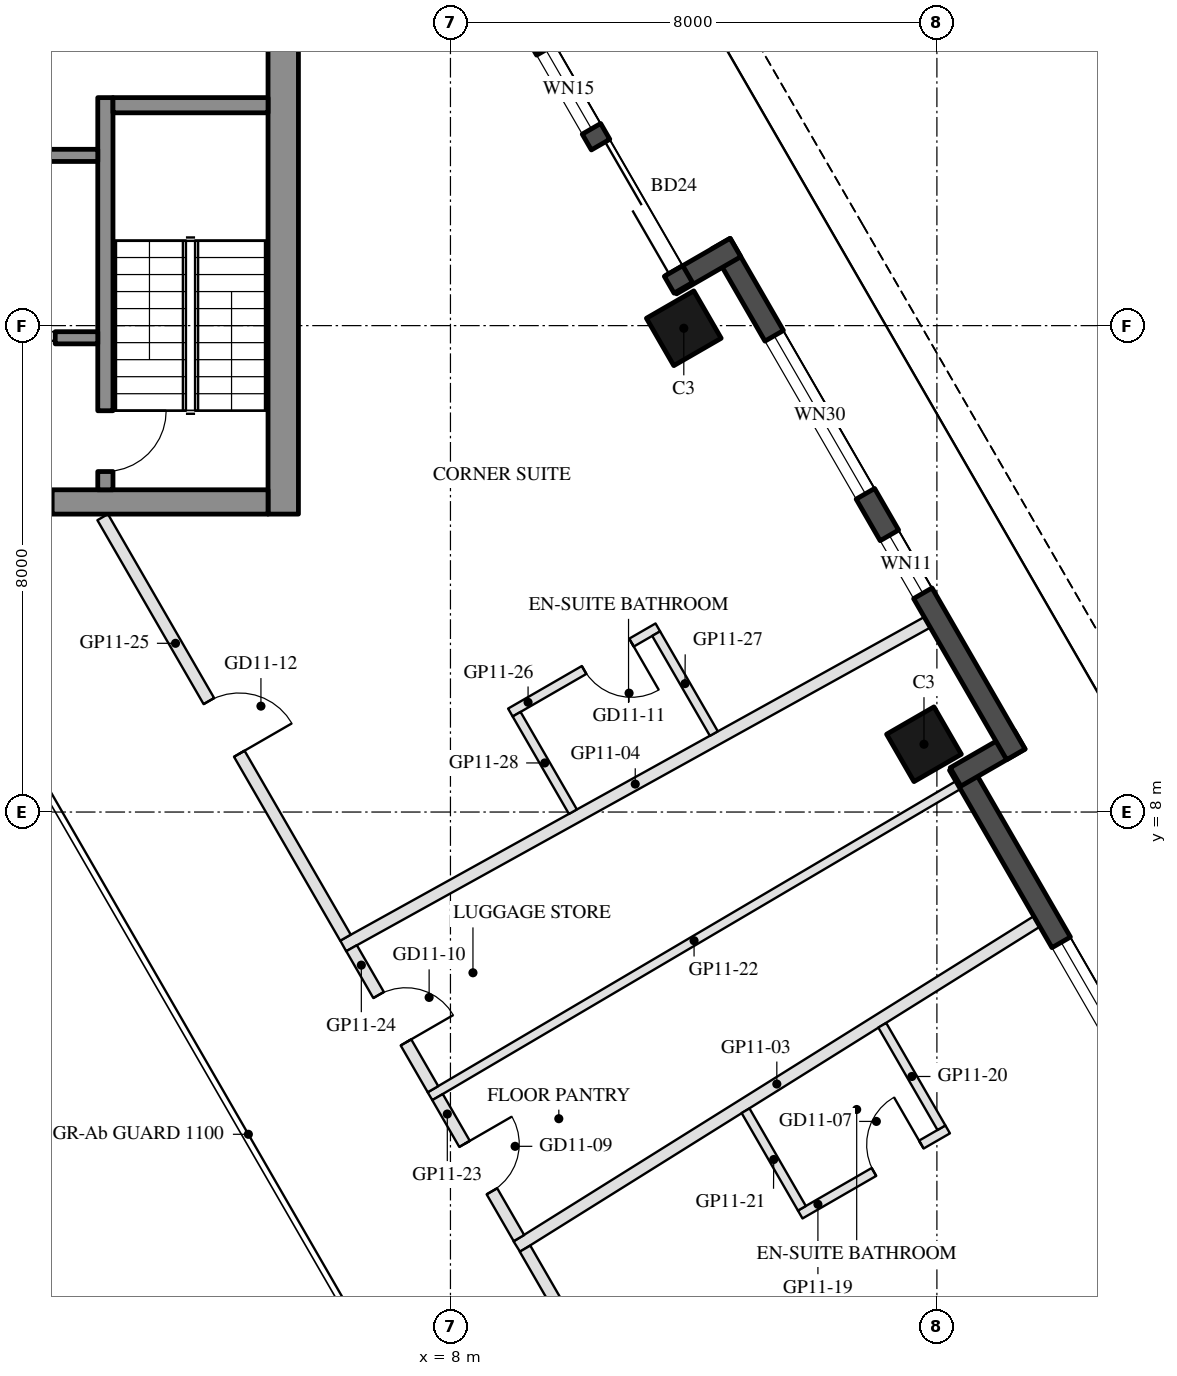
"""IFC4 building model, lengths in metres.
Left out: names, types, materials, properties, quantities, classifications, styles, units other than length and angle.
Written with IfcOpenShell. Run it as: python <this file> out.ifc"""

import sys

from ifc_helpers import new_model, si_unit, direction, frame, frame_2d, origin, origin_2d, place, context, subcontext, project, spatial, rectangle, hollow_rectangle, extrude, element, fill, save


model = new_model("IFC4")
c1 = context("Model", 3, precision=1e-05, world=origin(), true_north=direction((0.0, 1.0)))
c2 = subcontext(c1, "Body", "Model", "MODEL_VIEW")
j1 = project(units=[si_unit("LENGTHUNIT", "METRE"), si_unit("PLANEANGLEUNIT", "RADIAN")], contexts=[c1])
p1 = place(None, origin())
s1 = spatial("IfcSite", under=j1, at=p1, CompositionType="ELEMENT")
p2 = place(p1, origin())
s2 = spatial("IfcBuilding", under=s1, at=p2, CompositionType="ELEMENT")
p3 = place(p2, frame((0.0, 0.0, 124.2)))
s3 = spatial("IfcBuildingStorey", under=s2, at=p3, CompositionType="ELEMENT", Elevation=124.2)
for number, where, z_axis, x_axis in (
    (1, (15.788, 9.115, 0.0), (0.0, 0.0, 1.0), (-0.5, 0.866, 0.0)),
    (2, (11.838, 15.957, 0.0), (0.0, 0.0, 1.0), (-0.5, 0.866, 0.0)),
):
    element("IfcColumn", number, at=place(p3, frame(where, z_axis=z_axis, x_axis=x_axis)), inside=s3, PredefinedType="COLUMN", context=c2, shape_type="SweptSolid", body=[
        extrude(hollow_rectangle(XDim=0.9, YDim=0.9, WallThickness=0.04, at=origin_2d()), origin(), (0.0, 0.0, 1.0), 3.7),
    ])
p4 = place(p3, frame((19.729, 2.938, 0.0), z_axis=(0.0, 0.0, 1.0), x_axis=(-0.499976430342, 0.866039011305, 0.0)))
e3 = element("IfcWall", 3, at=p4, inside=s3, PredefinedType="SOLIDWALL", context=c2, shape_type="SweptSolid", body=[
    extrude(rectangle(XDim=6.74, YDim=0.35, at=frame_2d((3.37, 0.0))), origin(), (0.0, 0.0, 1.0), 3.55),
])
p5 = place(p4, frame((0.77, 0.0, 0.3)))
e4 = element("IfcOpeningElement", 4, at=p5, cuts=e3, PredefinedType="OPENING", context=c2, shape_type="SweptSolid", body=[
    extrude(rectangle(XDim=2.6, YDim=2.65, at=frame_2d((1.3, 1.325))), frame((0.0, 0.185, 0.0), z_axis=(0.0, -1.0, 0.0), x_axis=(1.0, 0.0, 0.0)), (0.0, 0.0, 1.0), 0.37),
])
p6 = place(p3, frame((16.306, 8.577, 0.0), z_axis=(0.0, 0.0, 1.0), x_axis=(0.866092288191, 0.499884134912, 0.0)))
e5 = element("IfcWall", 5, at=p6, inside=s3, PredefinedType="SOLIDWALL", context=c2, shape_type="SweptSolid", body=[
    extrude(rectangle(XDim=1.22, YDim=0.35, at=frame_2d((0.61, 0.0))), origin(), (0.0, 0.0, 1.0), 3.55),
])
p7 = place(p3, frame((17.299, 8.948, 0.0), z_axis=(0.0, 0.0, 1.0), x_axis=(-0.500010041276, 0.866019606374, 0.0)))
e6 = element("IfcWall", 6, at=p7, inside=s3, PredefinedType="SOLIDWALL", context=c2, shape_type="SweptSolid", body=[
    extrude(rectangle(XDim=9.7, YDim=0.35, at=frame_2d((4.85, 0.0))), origin(), (0.0, 0.0, 1.0), 3.55),
])
p8 = place(p7, frame((3.06, 0.0, 0.3)))
e7 = element("IfcOpeningElement", 7, at=p8, cuts=e6, PredefinedType="OPENING", context=c2, shape_type="SweptSolid", body=[
    extrude(rectangle(XDim=1.1, YDim=2.65, at=frame_2d((0.55, 1.325))), frame((0.0, 0.185, 0.0), z_axis=(0.0, -1.0, 0.0), x_axis=(1.0, 0.0, 0.0)), (0.0, 0.0, 1.0), 0.37),
])
p9 = place(p7, frame((4.949, 0.0, 0.3)))
e8 = element("IfcOpeningElement", 8, at=p9, cuts=e6, PredefinedType="OPENING", context=c2, shape_type="SweptSolid", body=[
    extrude(rectangle(XDim=3.0, YDim=2.65, at=frame_2d((1.5, 1.325))), frame((0.0, 0.185, 0.0), z_axis=(0.0, -1.0, 0.0), x_axis=(1.0, 0.0, 0.0)), (0.0, 0.0, 1.0), 0.37),
])
p10 = place(p3, frame((12.688, 17.284, 0.0), z_axis=(0.0, 0.0, 1.0), x_axis=(-0.865955602162, -0.500120880472, 0.0)))
e9 = element("IfcWall", 9, at=p10, inside=s3, PredefinedType="SOLIDWALL", context=c2, shape_type="SweptSolid", body=[
    extrude(rectangle(XDim=1.22, YDim=0.35, at=frame_2d((0.61, 0.0))), origin(), (0.0, 0.0, 1.0), 3.55),
])
p11 = place(p3, frame((11.829, 16.621, 0.0), z_axis=(0.0, 0.0, 1.0), x_axis=(-0.500003597184, 0.866023326939, 0.0)))
e10 = element("IfcWall", 10, at=p11, inside=s3, PredefinedType="SOLIDWALL", context=c2, shape_type="SweptSolid", body=[
    extrude(rectangle(XDim=6.74, YDim=0.35, at=frame_2d((3.37, 0.0))), origin(), (0.0, 0.0, 1.0), 3.55),
])
p12 = place(p11, frame((0.32, 0.0, 0.0)))
e11 = element("IfcOpeningElement", 11, at=p12, cuts=e10, PredefinedType="OPENING", context=c2, shape_type="SweptSolid", body=[
    extrude(rectangle(XDim=2.4, YDim=2.4, at=frame_2d((1.2, 1.2))), frame((0.0, 0.185, 0.0), z_axis=(0.0, -1.0, 0.0), x_axis=(1.0, 0.0, 0.0)), (0.0, 0.0, 1.0), 0.37),
])
p13 = place(p11, frame((3.02, 0.0, 0.3)))
e12 = element("IfcOpeningElement", 12, at=p13, cuts=e10, PredefinedType="OPENING", context=c2, shape_type="SweptSolid", body=[
    extrude(rectangle(XDim=1.5, YDim=2.65, at=frame_2d((0.75, 1.325))), frame((0.0, 0.185, 0.0), z_axis=(0.0, -1.0, 0.0), x_axis=(1.0, 0.0, 0.0)), (0.0, 0.0, 1.0), 0.37),
])
p14 = place(p11, frame((4.82, 0.0, 0.3)))
e13 = element("IfcOpeningElement", 13, at=p14, cuts=e10, PredefinedType="OPENING", context=c2, shape_type="SweptSolid", body=[
    extrude(rectangle(XDim=1.5, YDim=2.65, at=frame_2d((0.75, 1.325))), frame((0.0, 0.185, 0.0), z_axis=(0.0, -1.0, 0.0), x_axis=(1.0, 0.0, 0.0)), (0.0, 0.0, 1.0), 0.37),
])
p15 = place(p3, frame((5.25, 12.9, 0.0), z_axis=(0.0, 0.0, 1.0), x_axis=(0.0, 1.0, 0.0)))
e14 = element("IfcWall", 14, at=p15, inside=s3, PredefinedType="SHEAR", context=c2, shape_type="SweptSolid", body=[
    extrude(rectangle(XDim=14.837, YDim=0.5, at=frame_2d((7.418, 0.0))), origin(), (0.0, 0.0, 1.0), 3.5),
])
p16 = place(p3, frame((5.0, 13.1, 0.0), z_axis=(0.0, 0.0, 1.0), x_axis=(-1.0, 0.0, 0.0)))
e15 = element("IfcWall", 15, at=p16, inside=s3, PredefinedType="SHEAR", context=c2, shape_type="SweptSolid", body=[
    extrude(rectangle(XDim=10.0, YDim=0.4, at=frame_2d((5.0, 0.0))), origin(), (0.0, 0.0, 1.0), 3.5),
])
p17 = place(p16, frame((3.55, 0.0, 0.0)))
e16 = element("IfcOpeningElement", 16, at=p17, cuts=e15, PredefinedType="OPENING", context=c2, shape_type="SweptSolid", body=[
    extrude(rectangle(XDim=1.1, YDim=2.1, at=frame_2d((0.55, 1.05))), frame((0.0, 0.21, 0.0), z_axis=(0.0, -1.0, 0.0), x_axis=(1.0, 0.0, 0.0)), (0.0, 0.0, 1.0), 0.42),
])
p18 = place(p16, frame((5.85, 0.0, 0.0)))
e17 = element("IfcOpeningElement", 17, at=p18, cuts=e15, PredefinedType="OPENING", context=c2, shape_type="SweptSolid", body=[
    extrude(rectangle(XDim=1.4, YDim=2.1, at=frame_2d((0.7, 1.05))), frame((0.0, 0.21, 0.0), z_axis=(0.0, -1.0, 0.0), x_axis=(1.0, 0.0, 0.0)), (0.0, 0.0, 1.0), 0.42),
])
p19 = place(p3, frame((2.325, 13.3, 0.0), z_axis=(0.0, 0.0, 1.0), x_axis=(0.0, 1.0, 0.0)))
e18 = element("IfcWall", 18, at=p19, inside=s3, PredefinedType="SHEAR", context=c2, shape_type="SweptSolid", body=[
    extrude(rectangle(XDim=6.45, YDim=0.25, at=frame_2d((3.225, 0.0))), origin(), (0.0, 0.0, 1.0), 3.5),
])
p20 = place(p19, frame((0.3, 0.0, 0.0)))
e19 = element("IfcOpeningElement", 19, at=p20, cuts=e18, PredefinedType="OPENING", context=c2, shape_type="SweptSolid", body=[
    extrude(rectangle(XDim=1.0, YDim=2.1, at=frame_2d((0.5, 1.05))), frame((0.0, 0.135, 0.0), z_axis=(0.0, -1.0, 0.0), x_axis=(1.0, 0.0, 0.0)), (0.0, 0.0, 1.0), 0.27),
])
p21 = place(p3, frame((5.0, 19.625, 0.0), z_axis=(0.0, 0.0, 1.0), x_axis=(-1.0, 0.0, 0.0)))
e20 = element("IfcWall", 20, at=p21, inside=s3, PredefinedType="SHEAR", context=c2, shape_type="SweptSolid", body=[
    extrude(rectangle(XDim=2.55, YDim=0.25, at=frame_2d((1.275, 0.0))), origin(), (0.0, 0.0, 1.0), 3.5),
])
p22 = place(p3, frame((2.2, 18.8, 0.0), z_axis=(0.0, 0.0, 1.0), x_axis=(-1.0, 0.0, 0.0)))
e21 = element("IfcWall", 21, at=p22, inside=s3, PredefinedType="SHEAR", context=c2, shape_type="SweptSolid", body=[
    extrude(rectangle(XDim=2.8, YDim=0.2, at=frame_2d((1.4, 0.0))), origin(), (0.0, 0.0, 1.0), 3.5),
])
p23 = place(p3, frame((2.2, 15.8, 0.0), z_axis=(0.0, 0.0, 1.0), x_axis=(-1.0, 0.0, 0.0)))
e22 = element("IfcWall", 22, at=p23, inside=s3, PredefinedType="SHEAR", context=c2, shape_type="SweptSolid", body=[
    extrude(rectangle(XDim=2.8, YDim=0.2, at=frame_2d((1.4, 0.0))), origin(), (0.0, 0.0, 1.0), 3.5),
])
p24 = place(p23, frame((0.7, 0.0, 0.0)))
e23 = element("IfcOpeningElement", 23, at=p24, cuts=e22, PredefinedType="OPENING", context=c2, shape_type="SweptSolid", body=[
    extrude(rectangle(XDim=1.2, YDim=2.1, at=frame_2d((0.6, 1.05))), frame((0.0, 0.11, 0.0), z_axis=(0.0, -1.0, 0.0), x_axis=(1.0, 0.0, 0.0)), (0.0, 0.0, 1.0), 0.22),
])
p25 = place(p3, frame((17.643, 6.201, 0.0), z_axis=(0.0, 0.0, 1.0), x_axis=(-0.84787317287, -0.530199097252, 0.0)))
e24 = element("IfcWall", 24, at=p25, inside=s3, PredefinedType="PARTITIONING", context=c2, shape_type="SweptSolid", body=[
    extrude(rectangle(XDim=10.086, YDim=0.2, at=frame_2d((5.043, 0.0))), origin(), (0.0, 0.0, 1.0), 2.95),
])
p26 = place(p3, frame((15.842, 11.121, 0.0), z_axis=(0.0, 0.0, 1.0), x_axis=(-0.87471248602, -0.484642204931, 0.0)))
e25 = element("IfcWall", 25, at=p26, inside=s3, PredefinedType="PARTITIONING", context=c2, shape_type="SweptSolid", body=[
    extrude(rectangle(XDim=10.982, YDim=0.2, at=frame_2d((5.491, 0.0))), origin(), (0.0, 0.0, 1.0), 2.96),
])
p27 = place(p3, frame((9.226, 0.819, 0.0), z_axis=(0.0, 0.0, 1.0), x_axis=(0.500031571837, -0.866007175009, 0.0)))
e26 = element("IfcWall", 26, at=p27, inside=s3, PredefinedType="PARTITIONING", context=c2, shape_type="SweptSolid", body=[
    extrude(rectangle(XDim=6.084, YDim=0.2, at=frame_2d((3.042, 0.0))), origin(), (0.0, 0.0, 1.0), 2.95),
])
p28 = place(p27, frame((2.542, 0.0, 0.0)))
e27 = element("IfcOpeningElement", 27, at=p28, cuts=e26, PredefinedType="OPENING", context=c2, shape_type="SweptSolid", body=[
    extrude(rectangle(XDim=1.0, YDim=2.1, at=frame_2d((0.5, 1.05))), frame((0.0, 0.11, 0.0), z_axis=(0.0, -1.0, 0.0), x_axis=(1.0, 0.0, 0.0)), (0.0, 0.0, 1.0), 0.22),
])
p29 = place(p3, frame((13.752, 1.381, 0.0), z_axis=(0.0, 0.0, 1.0), x_axis=(0.866034573852, 0.49998411664, 0.0)))
e28 = element("IfcWall", 28, at=p29, inside=s3, PredefinedType="PARTITIONING", context=c2, shape_type="SweptSolid", body=[
    extrude(rectangle(XDim=2.8, YDim=0.15, at=frame_2d((1.4, 0.0))), origin(), (0.0, 0.0, 1.0), 3.55),
])
p30 = place(p29, frame((1.4, 0.0, 0.0)))
e29 = element("IfcOpeningElement", 29, at=p30, cuts=e28, PredefinedType="OPENING", context=c2, shape_type="SweptSolid", body=[
    extrude(rectangle(XDim=0.9, YDim=2.1, at=frame_2d((0.45, 1.05))), frame((0.0, 0.085, 0.0), z_axis=(0.0, -1.0, 0.0), x_axis=(1.0, 0.0, 0.0)), (0.0, 0.0, 1.0), 0.17),
])
p31 = place(p3, frame((16.075, 2.808, 0.0), z_axis=(0.0, 0.0, 1.0), x_axis=(-0.500051850797, 0.865995465643, 0.0)))
e30 = element("IfcWall", 30, at=p31, inside=s3, PredefinedType="PARTITIONING", context=c2, shape_type="SweptSolid", body=[
    extrude(rectangle(XDim=1.946, YDim=0.15, at=frame_2d((0.973, 0.0))), origin(), (0.0, 0.0, 1.0), 2.95),
])
p32 = place(p3, frame((13.78, 1.483, 0.0), z_axis=(0.0, 0.0, 1.0), x_axis=(-0.499965806267, 0.866045144646, 0.0)))
e31 = element("IfcWall", 31, at=p32, inside=s3, PredefinedType="PARTITIONING", context=c2, shape_type="SweptSolid", body=[
    extrude(rectangle(XDim=1.853, YDim=0.15, at=frame_2d((0.926, 0.0))), origin(), (0.0, 0.0, 1.0), 2.95),
])
p33 = place(p3, frame((16.349, 8.443, 0.0), z_axis=(0.0, 0.0, 1.0), x_axis=(-0.861589721102, -0.507605311724, 0.0)))
e32 = element("IfcWall", 32, at=p33, inside=s3, PredefinedType="PARTITIONING", context=c2, shape_type="SweptSolid", body=[
    extrude(rectangle(XDim=10.081, YDim=0.15, at=frame_2d((5.04, 0.0))), origin(), (0.0, 0.0, 1.0), 2.96),
])
p34 = place(p3, frame((7.788, 3.312, 0.0), z_axis=(0.0, 0.0, 1.0), x_axis=(0.499953984692, -0.866051969105, 0.0)))
e33 = element("IfcWall", 33, at=p34, inside=s3, PredefinedType="PARTITIONING", context=c2, shape_type="SweptSolid", body=[
    extrude(rectangle(XDim=2.677, YDim=0.2, at=frame_2d((1.339, 0.0))), origin(), (0.0, 0.0, 1.0), 3.55),
])
p35 = place(p34, frame((0.889, 0.0, 0.0)))
e34 = element("IfcOpeningElement", 34, at=p35, cuts=e33, PredefinedType="OPENING", context=c2, shape_type="SweptSolid", body=[
    extrude(rectangle(XDim=0.9, YDim=2.1, at=frame_2d((0.45, 1.05))), frame((0.0, 0.11, 0.0), z_axis=(0.0, -1.0, 0.0), x_axis=(1.0, 0.0, 0.0)), (0.0, 0.0, 1.0), 0.22),
])
p36 = place(p3, frame((6.374, 5.76, 0.0), z_axis=(0.0, 0.0, 1.0), x_axis=(0.499982891145, -0.866035281361, 0.0)))
e35 = element("IfcWall", 35, at=p36, inside=s3, PredefinedType="PARTITIONING", context=c2, shape_type="SweptSolid", body=[
    extrude(rectangle(XDim=2.678, YDim=0.2, at=frame_2d((1.339, 0.0))), origin(), (0.0, 0.0, 1.0), 2.95),
])
p37 = place(p36, frame((0.889, 0.0, 0.0)))
e36 = element("IfcOpeningElement", 36, at=p37, cuts=e35, PredefinedType="OPENING", context=c2, shape_type="SweptSolid", body=[
    extrude(rectangle(XDim=0.9, YDim=2.1, at=frame_2d((0.45, 1.05))), frame((0.0, 0.11, 0.0), z_axis=(0.0, -1.0, 0.0), x_axis=(1.0, 0.0, 0.0)), (0.0, 0.0, 1.0), 0.22),
])
p38 = place(p3, frame((2.281, 12.85, 0.0), z_axis=(0.0, 0.0, 1.0), x_axis=(0.499992362392, -0.866029813314, 0.0)))
e37 = element("IfcWall", 37, at=p38, inside=s3, PredefinedType="PARTITIONING", context=c2, shape_type="SweptSolid", body=[
    extrude(rectangle(XDim=7.986, YDim=0.2, at=frame_2d((3.993, 0.0))), origin(), (0.0, 0.0, 1.0), 2.95),
])
p39 = place(p38, frame((3.493, 0.0, 0.0)))
e38 = element("IfcOpeningElement", 38, at=p39, cuts=e37, PredefinedType="OPENING", context=c2, shape_type="SweptSolid", body=[
    extrude(rectangle(XDim=1.0, YDim=2.1, at=frame_2d((0.5, 1.05))), frame((0.0, 0.11, 0.0), z_axis=(0.0, -1.0, 0.0), x_axis=(1.0, 0.0, 0.0)), (0.0, 0.0, 1.0), 0.22),
])
p40 = place(p3, frame((11.41, 11.037, 0.0), z_axis=(0.0, 0.0, 1.0), x_axis=(-0.866034573852, -0.49998411664, 0.0)))
e39 = element("IfcWall", 39, at=p40, inside=s3, PredefinedType="PARTITIONING", context=c2, shape_type="SweptSolid", body=[
    extrude(rectangle(XDim=2.8, YDim=0.15, at=frame_2d((1.4, 0.0))), origin(), (0.0, 0.0, 1.0), 2.95),
])
p41 = place(p40, frame((0.5, 0.0, 0.0)))
e40 = element("IfcOpeningElement", 40, at=p41, cuts=e39, PredefinedType="OPENING", context=c2, shape_type="SweptSolid", body=[
    extrude(rectangle(XDim=0.9, YDim=2.1, at=frame_2d((0.45, 1.05))), frame((0.0, 0.085, 0.0), z_axis=(0.0, -1.0, 0.0), x_axis=(1.0, 0.0, 0.0)), (0.0, 0.0, 1.0), 0.17),
])
p42 = place(p3, frame((12.332, 9.29, 0.0), z_axis=(0.0, 0.0, 1.0), x_axis=(-0.499971120268, 0.866042076863, 0.0)))
e41 = element("IfcWall", 41, at=p42, inside=s3, PredefinedType="PARTITIONING", context=c2, shape_type="SweptSolid", body=[
    extrude(rectangle(XDim=1.898, YDim=0.15, at=frame_2d((0.949, 0.0))), origin(), (0.0, 0.0, 1.0), 3.55),
])
p43 = place(p3, frame((10.014, 8.006, 0.0), z_axis=(0.0, 0.0, 1.0), x_axis=(-0.500053484023, 0.865994522568, 0.0)))
e42 = element("IfcWall", 42, at=p43, inside=s3, PredefinedType="PARTITIONING", context=c2, shape_type="SweptSolid", body=[
    extrude(rectangle(XDim=1.851, YDim=0.15, at=frame_2d((0.926, 0.0))), origin(), (0.0, 0.0, 1.0), 3.55),
])
p44 = place(p5, origin())
e43 = element("IfcWindow", 43, at=p44, inside=s3, PartitioningType="SINGLE_PANEL", PredefinedType="WINDOW", context=c2, shape_type="SweptSolid", body=[
    extrude(rectangle(XDim=2.6, YDim=2.65, at=frame_2d((1.3, 1.325))), frame((0.0, 0.03, 0.0), z_axis=(0.0, -1.0, 0.0), x_axis=(1.0, 0.0, 0.0)), (0.0, 0.0, 1.0), 0.06),
])
fill(e4, e43)
p45 = place(p8, origin())
e44 = element("IfcWindow", 44, at=p45, inside=s3, PartitioningType="SINGLE_PANEL", PredefinedType="WINDOW", context=c2, shape_type="SweptSolid", body=[
    extrude(rectangle(XDim=1.1, YDim=2.65, at=frame_2d((0.55, 1.325))), frame((0.0, 0.03, 0.0), z_axis=(0.0, -1.0, 0.0), x_axis=(1.0, 0.0, 0.0)), (0.0, 0.0, 1.0), 0.06),
])
fill(e7, e44)
p46 = place(p9, origin())
e45 = element("IfcWindow", 45, at=p46, inside=s3, PartitioningType="SINGLE_PANEL", PredefinedType="WINDOW", context=c2, shape_type="SweptSolid", body=[
    extrude(rectangle(XDim=3.0, YDim=2.65, at=frame_2d((1.5, 1.325))), frame((0.0, 0.03, 0.0), z_axis=(0.0, -1.0, 0.0), x_axis=(1.0, 0.0, 0.0)), (0.0, 0.0, 1.0), 0.06),
])
fill(e8, e45)
p47 = place(p12, frame((2.4, 0.0, 0.0), z_axis=(0.0, 0.0, 1.0), x_axis=(-1.0, 0.0, 0.0)))
e46 = element("IfcDoor", 46, at=p47, inside=s3, OperationType="SLIDING_TO_LEFT", PredefinedType="DOOR", context=c2, shape_type="SweptSolid", body=[
    extrude(rectangle(XDim=2.4, YDim=2.4, at=frame_2d((1.2, 1.2))), frame((0.0, 0.025, 0.0), z_axis=(0.0, -1.0, 0.0), x_axis=(1.0, 0.0, 0.0)), (0.0, 0.0, 1.0), 0.05),
])
fill(e11, e46)
p48 = place(p13, origin())
e47 = element("IfcWindow", 47, at=p48, inside=s3, PartitioningType="SINGLE_PANEL", PredefinedType="WINDOW", context=c2, shape_type="SweptSolid", body=[
    extrude(rectangle(XDim=1.5, YDim=2.65, at=frame_2d((0.75, 1.325))), frame((0.0, 0.03, 0.0), z_axis=(0.0, -1.0, 0.0), x_axis=(1.0, 0.0, 0.0)), (0.0, 0.0, 1.0), 0.06),
])
fill(e12, e47)
p49 = place(p24, origin())
e48 = element("IfcDoor", 48, at=p49, inside=s3, OperationType="DOUBLE_DOOR_SLIDING", PredefinedType="DOOR", context=c2, shape_type="SweptSolid", body=[
    extrude(rectangle(XDim=1.2, YDim=2.1, at=frame_2d((0.6, 1.05))), frame((0.0, 0.025, 0.0), z_axis=(0.0, -1.0, 0.0), x_axis=(1.0, 0.0, 0.0)), (0.0, 0.0, 1.0), 0.05),
])
fill(e23, e48)
p50 = place(p20, frame((1.0, 0.0, 0.0), z_axis=(0.0, 0.0, 1.0), x_axis=(-1.0, 0.0, 0.0)))
e49 = element("IfcDoor", 49, at=p50, inside=s3, OperationType="SINGLE_SWING_LEFT", PredefinedType="DOOR", context=c2, shape_type="SweptSolid", body=[
    extrude(rectangle(XDim=1.0, YDim=2.1, at=frame_2d((0.5, 1.05))), frame((0.0, 0.025, 0.0), z_axis=(0.0, -1.0, 0.0), x_axis=(1.0, 0.0, 0.0)), (0.0, 0.0, 1.0), 0.05),
])
fill(e19, e49)
p51 = place(p30, origin())
e50 = element("IfcDoor", 50, at=p51, inside=s3, OperationType="SINGLE_SWING_RIGHT", PredefinedType="DOOR", context=c2, shape_type="SweptSolid", body=[
    extrude(rectangle(XDim=0.9, YDim=2.1, at=frame_2d((0.45, 1.05))), frame((0.0, 0.025, 0.0), z_axis=(0.0, -1.0, 0.0), x_axis=(1.0, 0.0, 0.0)), (0.0, 0.0, 1.0), 0.05),
])
fill(e29, e50)
p52 = place(p35, origin())
e51 = element("IfcDoor", 51, at=p52, inside=s3, OperationType="SINGLE_SWING_LEFT", PredefinedType="DOOR", context=c2, shape_type="SweptSolid", body=[
    extrude(rectangle(XDim=0.9, YDim=2.1, at=frame_2d((0.45, 1.05))), frame((0.0, 0.025, 0.0), z_axis=(0.0, -1.0, 0.0), x_axis=(1.0, 0.0, 0.0)), (0.0, 0.0, 1.0), 0.05),
])
fill(e34, e51)
p53 = place(p37, origin())
e52 = element("IfcDoor", 52, at=p53, inside=s3, OperationType="SINGLE_SWING_RIGHT", PredefinedType="DOOR", context=c2, shape_type="SweptSolid", body=[
    extrude(rectangle(XDim=0.9, YDim=2.1, at=frame_2d((0.45, 1.05))), frame((0.0, 0.025, 0.0), z_axis=(0.0, -1.0, 0.0), x_axis=(1.0, 0.0, 0.0)), (0.0, 0.0, 1.0), 0.05),
])
fill(e36, e52)
p54 = place(p41, origin())
e53 = element("IfcDoor", 53, at=p54, inside=s3, OperationType="SINGLE_SWING_LEFT", PredefinedType="DOOR", context=c2, shape_type="SweptSolid", body=[
    extrude(rectangle(XDim=0.9, YDim=2.1, at=frame_2d((0.45, 1.05))), frame((0.0, 0.025, 0.0), z_axis=(0.0, -1.0, 0.0), x_axis=(1.0, 0.0, 0.0)), (0.0, 0.0, 1.0), 0.05),
])
fill(e40, e53)
p55 = place(p39, origin())
e54 = element("IfcDoor", 54, at=p55, inside=s3, OperationType="SINGLE_SWING_RIGHT", PredefinedType="DOOR", context=c2, shape_type="SweptSolid", body=[
    extrude(rectangle(XDim=1.0, YDim=2.1, at=frame_2d((0.5, 1.05))), frame((0.0, 0.025, 0.0), z_axis=(0.0, -1.0, 0.0), x_axis=(1.0, 0.0, 0.0)), (0.0, 0.0, 1.0), 0.05),
])
fill(e38, e54)
save(model, sys.argv[1])
